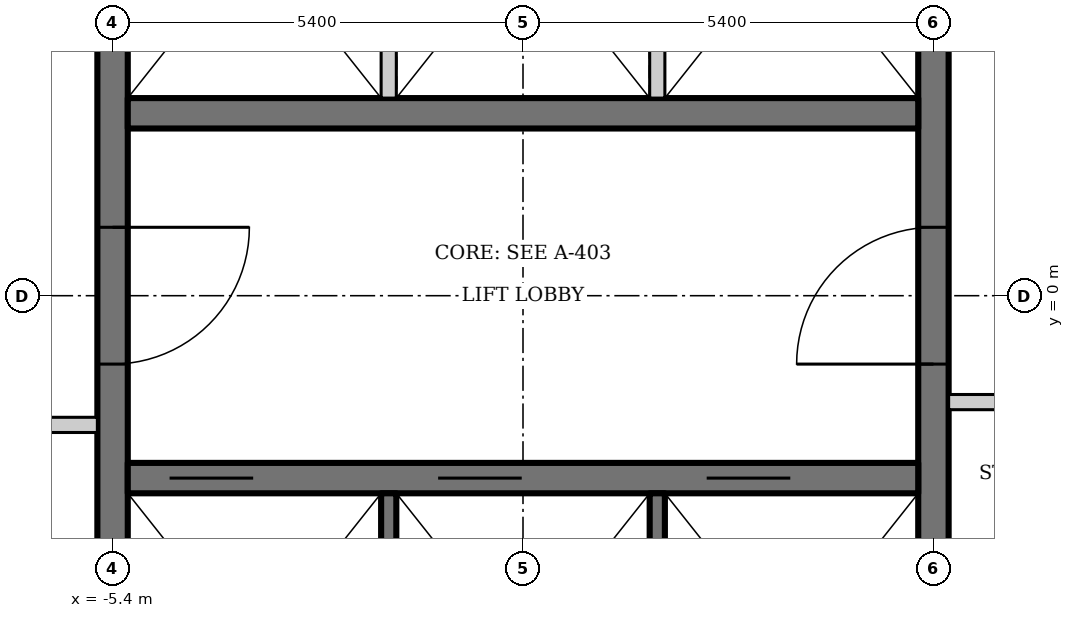
"""IFC4 building model, lengths in metres.
Left out: names, types, materials, properties, quantities, classifications, styles, units other than length and angle.
Written with IfcOpenShell. Run it as: python <this file> out.ifc"""

import sys

from ifc_helpers import new_model, si_unit, direction, frame, frame_2d, origin, place, context, subcontext, project, spatial, rectangle, extrude, element, fill, save


model = new_model("IFC4")
c1 = context("Model", 3, precision=1e-05, world=origin(), true_north=direction((0.0, 1.0)))
c2 = subcontext(c1, "Body", "Model", "MODEL_VIEW")
j1 = project(units=[si_unit("LENGTHUNIT", "METRE"), si_unit("PLANEANGLEUNIT", "RADIAN")], contexts=[c1])
p1 = place(None, origin())
s1 = spatial("IfcSite", under=j1, at=p1, CompositionType="ELEMENT")
p2 = place(p1, origin())
s2 = spatial("IfcBuilding", under=s1, at=p2, CompositionType="ELEMENT")
p3 = place(p2, frame((0.0, 0.0, 55.0)))
s3 = spatial("IfcBuildingStorey", under=s2, at=p3, CompositionType="ELEMENT", Elevation=55.0)
p4 = place(p3, frame((5.4, -6.8, 0.0), z_axis=(0.0, 0.0, 1.0), x_axis=(0.0, 1.0, 0.0)))
e1 = element("IfcWall", 1, at=p4, inside=s3, PredefinedType="SHEAR", context=c2, shape_type="SweptSolid", body=[
    extrude(rectangle(XDim=13.6, YDim=0.4, at=frame_2d((6.8, 0.0))), origin(), (0.0, 0.0, 1.0), 3.6),
])
p5 = place(p4, frame((5.9, 0.0, 0.0)))
e2 = element("IfcOpeningElement", 2, at=p5, cuts=e1, PredefinedType="OPENING", context=c2, shape_type="SweptSolid", body=[
    extrude(rectangle(XDim=1.8, YDim=2.1, at=frame_2d((0.9, 1.05))), frame((0.0, 0.21, 0.0), z_axis=(0.0, -1.0, 0.0), x_axis=(1.0, 0.0, 0.0)), (0.0, 0.0, 1.0), 0.42),
])
p6 = place(p3, frame((-5.4, 6.8, 0.0), z_axis=(0.0, 0.0, 1.0), x_axis=(0.0, -1.0, 0.0)))
e3 = element("IfcWall", 3, at=p6, inside=s3, PredefinedType="SHEAR", context=c2, shape_type="SweptSolid", body=[
    extrude(rectangle(XDim=13.6, YDim=0.4, at=frame_2d((6.8, 0.0))), origin(), (0.0, 0.0, 1.0), 3.6),
])
p7 = place(p6, frame((5.9, 0.0, 0.0)))
e4 = element("IfcOpeningElement", 4, at=p7, cuts=e3, PredefinedType="OPENING", context=c2, shape_type="SweptSolid", body=[
    extrude(rectangle(XDim=1.8, YDim=2.1, at=frame_2d((0.9, 1.05))), frame((0.0, 0.21, 0.0), z_axis=(0.0, -1.0, 0.0), x_axis=(1.0, 0.0, 0.0)), (0.0, 0.0, 1.0), 0.42),
])
p8 = place(p3, frame((-5.2, -2.4, 0.0), z_axis=(0.0, 0.0, 1.0), x_axis=(1.0, 0.0, 0.0)))
e5 = element("IfcWall", 5, at=p8, inside=s3, PredefinedType="SHEAR", context=c2, shape_type="SweptSolid", body=[
    extrude(rectangle(XDim=10.4, YDim=0.4, at=frame_2d((5.2, 0.0))), origin(), (0.0, 0.0, 1.0), 3.6),
])
p9 = place(p8, frame((0.55, 0.0, 0.0)))
e6 = element("IfcOpeningElement", 6, at=p9, cuts=e5, PredefinedType="OPENING", context=c2, shape_type="SweptSolid", body=[
    extrude(rectangle(XDim=1.1, YDim=2.2, at=frame_2d((0.55, 1.1))), frame((0.0, 0.21, 0.0), z_axis=(0.0, -1.0, 0.0), x_axis=(1.0, 0.0, 0.0)), (0.0, 0.0, 1.0), 0.42),
])
p10 = place(p8, frame((4.083, 0.0, 0.0)))
e7 = element("IfcOpeningElement", 7, at=p10, cuts=e5, PredefinedType="OPENING", context=c2, shape_type="SweptSolid", body=[
    extrude(rectangle(XDim=1.1, YDim=2.2, at=frame_2d((0.55, 1.1))), frame((0.0, 0.21, 0.0), z_axis=(0.0, -1.0, 0.0), x_axis=(1.0, 0.0, 0.0)), (0.0, 0.0, 1.0), 0.42),
])
p11 = place(p8, frame((7.617, 0.0, 0.0)))
e8 = element("IfcOpeningElement", 8, at=p11, cuts=e5, PredefinedType="OPENING", context=c2, shape_type="SweptSolid", body=[
    extrude(rectangle(XDim=1.1, YDim=2.2, at=frame_2d((0.55, 1.1))), frame((0.0, 0.21, 0.0), z_axis=(0.0, -1.0, 0.0), x_axis=(1.0, 0.0, 0.0)), (0.0, 0.0, 1.0), 0.42),
])
for number, where, z_axis, x_axis in (
    (9, (-1.767, -2.6, 0.0), (0.0, 0.0, 1.0), (0.0, -1.0, 0.0)),
    (10, (1.767, -2.6, 0.0), (0.0, 0.0, 1.0), (0.0, -1.0, 0.0)),
):
    element("IfcWall", number, at=place(p3, frame(where, z_axis=z_axis, x_axis=x_axis)), inside=s3, PredefinedType="SOLIDWALL", context=c2, shape_type="SweptSolid", body=[
        extrude(rectangle(XDim=4.2, YDim=0.2, at=frame_2d((2.1, 0.0))), origin(), (0.0, 0.0, 1.0), 3.6),
    ])
p12 = place(p3, frame((5.2, 2.4, 0.0), z_axis=(0.0, 0.0, 1.0), x_axis=(-1.0, 0.0, 0.0)))
e11 = element("IfcWall", 11, at=p12, inside=s3, PredefinedType="SHEAR", context=c2, shape_type="SweptSolid", body=[
    extrude(rectangle(XDim=10.4, YDim=0.4, at=frame_2d((5.2, 0.0))), origin(), (0.0, 0.0, 1.0), 3.6),
])
for number, where, z_axis, x_axis in (
    (12, (-1.767, 2.6, 0.0), (0.0, 0.0, 1.0), (0.0, 1.0, 0.0)),
    (13, (1.767, 2.6, 0.0), (0.0, 0.0, 1.0), (0.0, 1.0, 0.0)),
):
    element("IfcWall", number, at=place(p3, frame(where, z_axis=z_axis, x_axis=x_axis)), inside=s3, PredefinedType="SOLIDWALL", context=c2, shape_type="SweptSolid", body=[
        extrude(rectangle(XDim=4.2, YDim=0.2, at=frame_2d((2.1, 0.0))), origin(), (0.0, 0.0, 1.0), 3.6),
    ])
p13 = place(p3, frame((-5.6, -1.7, 0.0), z_axis=(0.0, 0.0, 1.0), x_axis=(-1.0, 0.0, 0.0)))
e14 = element("IfcWall", 14, at=p13, inside=s3, PredefinedType="SOLIDWALL", context=c2, shape_type="SweptSolid", body=[
    extrude(rectangle(XDim=3.2, YDim=0.2, at=frame_2d((1.6, 0.0))), origin(), (0.0, 0.0, 1.0), 3.45),
])
p14 = place(p13, frame((1.15, 0.0, 0.0)))
e15 = element("IfcOpeningElement", 15, at=p14, cuts=e14, PredefinedType="OPENING", context=c2, shape_type="SweptSolid", body=[
    extrude(rectangle(XDim=0.9, YDim=2.1, at=frame_2d((0.45, 1.05))), frame((0.0, 0.11, 0.0), z_axis=(0.0, -1.0, 0.0), x_axis=(1.0, 0.0, 0.0)), (0.0, 0.0, 1.0), 0.22),
])
p15 = place(p3, frame((5.6, -1.4, 0.0), z_axis=(0.0, 0.0, 1.0), x_axis=(1.0, 0.0, 0.0)))
e16 = element("IfcWall", 16, at=p15, inside=s3, PredefinedType="SOLIDWALL", context=c2, shape_type="SweptSolid", body=[
    extrude(rectangle(XDim=2.2, YDim=0.2, at=frame_2d((1.1, 0.0))), origin(), (0.0, 0.0, 1.0), 3.45),
])
p16 = place(p15, frame((0.65, 0.0, 0.0)))
e17 = element("IfcOpeningElement", 17, at=p16, cuts=e16, PredefinedType="OPENING", context=c2, shape_type="SweptSolid", body=[
    extrude(rectangle(XDim=0.9, YDim=2.1, at=frame_2d((0.45, 1.05))), frame((0.0, 0.11, 0.0), z_axis=(0.0, -1.0, 0.0), x_axis=(1.0, 0.0, 0.0)), (0.0, 0.0, 1.0), 0.22),
])
p17 = place(p5, origin())
e18 = element("IfcDoor", 18, at=p17, inside=s3, OperationType="DOUBLE_DOOR_DOUBLE_SWING", PredefinedType="DOOR", context=c2, shape_type="SweptSolid", body=[
    extrude(rectangle(XDim=1.8, YDim=2.1, at=frame_2d((0.9, 1.05))), frame((0.0, 0.025, 0.0), z_axis=(0.0, -1.0, 0.0), x_axis=(1.0, 0.0, 0.0)), (0.0, 0.0, 1.0), 0.05),
])
fill(e2, e18)
p18 = place(p7, origin())
e19 = element("IfcDoor", 19, at=p18, inside=s3, OperationType="DOUBLE_DOOR_DOUBLE_SWING", PredefinedType="DOOR", context=c2, shape_type="SweptSolid", body=[
    extrude(rectangle(XDim=1.8, YDim=2.1, at=frame_2d((0.9, 1.05))), frame((0.0, 0.025, 0.0), z_axis=(0.0, -1.0, 0.0), x_axis=(1.0, 0.0, 0.0)), (0.0, 0.0, 1.0), 0.05),
])
fill(e4, e19)
p19 = place(p9, origin())
e20 = element("IfcDoor", 20, at=p19, inside=s3, OperationType="DOUBLE_DOOR_SLIDING", PredefinedType="DOOR", context=c2, shape_type="SweptSolid", body=[
    extrude(rectangle(XDim=1.1, YDim=2.2, at=frame_2d((0.55, 1.1))), frame((0.0, 0.025, 0.0), z_axis=(0.0, -1.0, 0.0), x_axis=(1.0, 0.0, 0.0)), (0.0, 0.0, 1.0), 0.05),
])
fill(e6, e20)
p20 = place(p10, origin())
e21 = element("IfcDoor", 21, at=p20, inside=s3, OperationType="DOUBLE_DOOR_SLIDING", PredefinedType="DOOR", context=c2, shape_type="SweptSolid", body=[
    extrude(rectangle(XDim=1.1, YDim=2.2, at=frame_2d((0.55, 1.1))), frame((0.0, 0.025, 0.0), z_axis=(0.0, -1.0, 0.0), x_axis=(1.0, 0.0, 0.0)), (0.0, 0.0, 1.0), 0.05),
])
fill(e7, e21)
p21 = place(p11, origin())
e22 = element("IfcDoor", 22, at=p21, inside=s3, OperationType="DOUBLE_DOOR_SLIDING", PredefinedType="DOOR", context=c2, shape_type="SweptSolid", body=[
    extrude(rectangle(XDim=1.1, YDim=2.2, at=frame_2d((0.55, 1.1))), frame((0.0, 0.025, 0.0), z_axis=(0.0, -1.0, 0.0), x_axis=(1.0, 0.0, 0.0)), (0.0, 0.0, 1.0), 0.05),
])
fill(e8, e22)
save(model, sys.argv[1])
